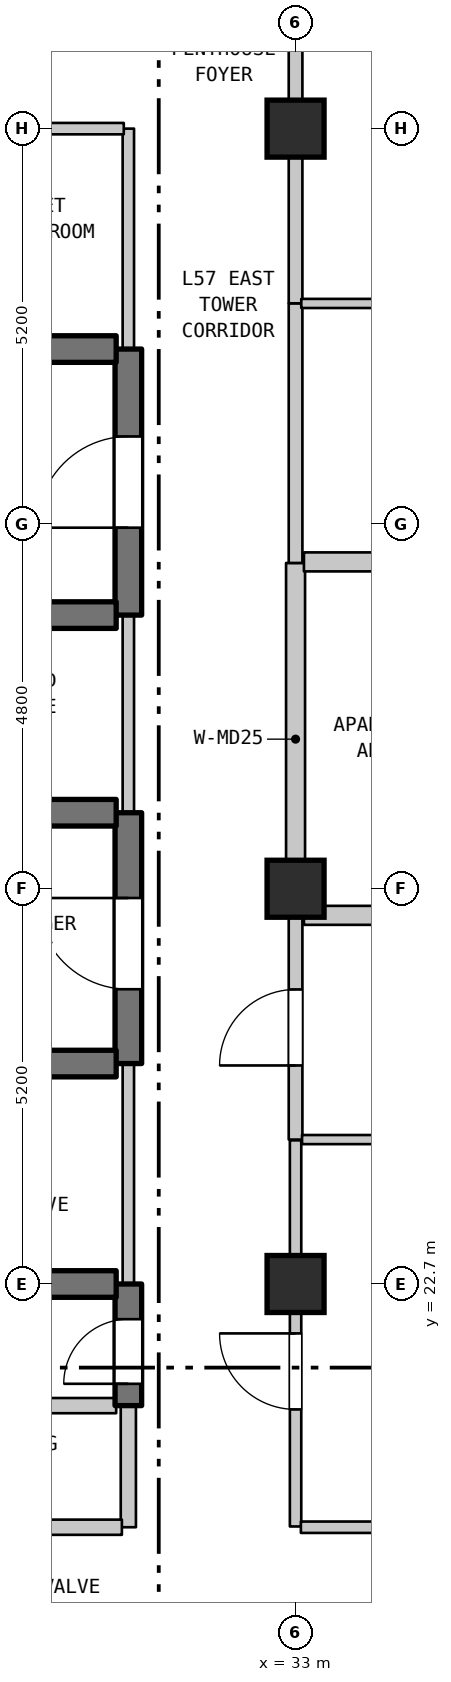
"""IFC4 building model, lengths in metres.
Left out: names, types, materials, properties, quantities, classifications, styles, units other than length and angle.
Written with IfcOpenShell. Run it as: python <this file> out.ifc"""

import sys

from ifc_helpers import new_model, si_unit, direction, frame, frame_2d, origin, origin_2d, place, context, subcontext, project, spatial, rectangle, extrude, element, fill, save


model = new_model("IFC4")
c1 = context("Model", 3, precision=1e-05, world=origin(), true_north=direction((0.0, 1.0)))
c2 = subcontext(c1, "Body", "Model", "MODEL_VIEW")
j1 = project(units=[si_unit("LENGTHUNIT", "METRE"), si_unit("PLANEANGLEUNIT", "RADIAN")], contexts=[c1])
p1 = place(None, origin())
s1 = spatial("IfcSite", under=j1, at=p1, CompositionType="ELEMENT")
p2 = place(p1, origin())
s2 = spatial("IfcBuilding", under=s1, at=p2, CompositionType="ELEMENT")
p3 = place(p2, frame((0.0, 0.0, 230.2)))
s3 = spatial("IfcBuildingStorey", under=s2, at=p3, CompositionType="ELEMENT", Elevation=230.2)
for number, where, z_axis, x_axis in (
    (1, (33.0, 22.7, 0.0), (0.0, 0.0, 1.0), (1.0, 0.0, 0.0)),
    (2, (33.0, 27.9, 0.0), (0.0, 0.0, 1.0), (1.0, 0.0, 0.0)),
    (3, (33.0, 37.9, 0.0), (0.0, 0.0, 1.0), (1.0, 0.0, 0.0)),
):
    element("IfcColumn", number, at=place(p3, frame(where, z_axis=z_axis, x_axis=x_axis)), inside=s3, PredefinedType="COLUMN", context=c2, shape_type="SweptSolid", body=[
        extrude(rectangle(XDim=0.75, YDim=0.75, at=origin_2d()), origin(), (0.0, 0.0, 1.0), 3.7),
    ])
p4 = place(p3, frame((30.8, 19.5, 0.0), z_axis=(0.0, 0.0, 1.0), x_axis=(0.0, 1.0, 0.0)))
e4 = element("IfcWall", 4, at=p4, inside=s3, PredefinedType="STANDARD", context=c2, shape_type="SweptSolid", body=[
    extrude(rectangle(XDim=1.6, YDim=0.2, at=frame_2d((0.8, 0.0))), origin(), (0.0, 0.0, 1.0), 3.39),
])
p5 = place(p3, frame((30.8, 21.1, 0.0), z_axis=(0.0, 0.0, 1.0), x_axis=(0.0, 1.0, 0.0)))
e5 = element("IfcWall", 5, at=p5, inside=s3, PredefinedType="SHEAR", context=c2, shape_type="SweptSolid", body=[
    extrude(rectangle(XDim=1.6, YDim=0.35, at=frame_2d((0.8, 0.0))), origin(), (0.0, 0.0, 1.0), 3.39),
])
p6 = place(p5, frame((0.287, 0.0, 0.0)))
e6 = element("IfcOpeningElement", 6, at=p6, cuts=e5, PredefinedType="OPENING", context=c2, shape_type="SweptSolid", body=[
    extrude(rectangle(XDim=0.85, YDim=2.1, at=frame_2d((0.425, 1.05))), frame((0.0, 0.185, 0.0), z_axis=(0.0, -1.0, 0.0), x_axis=(1.0, 0.0, 0.0)), (0.0, 0.0, 1.0), 0.37),
])
p7 = place(p3, frame((30.8, 22.7, 0.0), z_axis=(0.0, 0.0, 1.0), x_axis=(0.0, 1.0, 0.0)))
e7 = element("IfcWall", 7, at=p7, inside=s3, PredefinedType="STANDARD", context=c2, shape_type="SweptSolid", body=[
    extrude(rectangle(XDim=2.9, YDim=0.15, at=frame_2d((1.45, 0.0))), origin(), (0.0, 0.0, 1.0), 3.39),
])
p8 = place(p3, frame((30.8, 25.6, 0.0), z_axis=(0.0, 0.0, 1.0), x_axis=(0.0, 1.0, 0.0)))
e8 = element("IfcWall", 8, at=p8, inside=s3, PredefinedType="SHEAR", context=c2, shape_type="SweptSolid", body=[
    extrude(rectangle(XDim=3.3, YDim=0.35, at=frame_2d((1.65, 0.0))), origin(), (0.0, 0.0, 1.0), 3.39),
])
p9 = place(p8, frame((0.978, 0.0, 0.0)))
e9 = element("IfcOpeningElement", 9, at=p9, cuts=e8, PredefinedType="OPENING", context=c2, shape_type="SweptSolid", body=[
    extrude(rectangle(XDim=1.2, YDim=2.2, at=frame_2d((0.6, 1.1))), frame((0.0, 0.185, 0.0), z_axis=(0.0, -1.0, 0.0), x_axis=(1.0, 0.0, 0.0)), (0.0, 0.0, 1.0), 0.37),
])
p10 = place(p3, frame((30.8, 28.9, 0.0), z_axis=(0.0, 0.0, 1.0), x_axis=(0.0, 1.0, 0.0)))
e10 = element("IfcWall", 10, at=p10, inside=s3, PredefinedType="STANDARD", context=c2, shape_type="SweptSolid", body=[
    extrude(rectangle(XDim=2.6, YDim=0.15, at=frame_2d((1.3, 0.0))), origin(), (0.0, 0.0, 1.0), 3.39),
])
p11 = place(p3, frame((30.8, 31.5, 0.0), z_axis=(0.0, 0.0, 1.0), x_axis=(0.0, 1.0, 0.0)))
e11 = element("IfcWall", 11, at=p11, inside=s3, PredefinedType="SHEAR", context=c2, shape_type="SweptSolid", body=[
    extrude(rectangle(XDim=3.5, YDim=0.35, at=frame_2d((1.75, 0.0))), origin(), (0.0, 0.0, 1.0), 3.39),
])
p12 = place(p11, frame((1.15, 0.0, 0.0)))
e12 = element("IfcOpeningElement", 12, at=p12, cuts=e11, PredefinedType="OPENING", context=c2, shape_type="SweptSolid", body=[
    extrude(rectangle(XDim=1.2, YDim=2.2, at=frame_2d((0.6, 1.1))), frame((0.0, 0.185, 0.0), z_axis=(0.0, -1.0, 0.0), x_axis=(1.0, 0.0, 0.0)), (0.0, 0.0, 1.0), 0.37),
])
p13 = place(p3, frame((30.8, 35.0, 0.0), z_axis=(0.0, 0.0, 1.0), x_axis=(0.0, 1.0, 0.0)))
e13 = element("IfcWall", 13, at=p13, inside=s3, PredefinedType="STANDARD", context=c2, shape_type="SweptSolid", body=[
    extrude(rectangle(XDim=2.9, YDim=0.15, at=frame_2d((1.45, 0.0))), origin(), (0.0, 0.0, 1.0), 3.39),
])
p14 = place(p3, frame((33.0, 19.51, 0.0), z_axis=(0.0, 0.0, 1.0), x_axis=(0.0, 1.0, 0.0)))
e14 = element("IfcWall", 14, at=p14, inside=s3, PredefinedType="STANDARD", context=c2, shape_type="SweptSolid", body=[
    extrude(rectangle(XDim=5.08, YDim=0.15, at=frame_2d((2.54, 0.0))), origin(), (0.0, 0.0, 1.0), 2.99),
])
p15 = place(p14, frame((1.54, 0.0, 0.0)))
e15 = element("IfcOpeningElement", 15, at=p15, cuts=e14, PredefinedType="OPENING", context=c2, shape_type="SweptSolid", body=[
    extrude(rectangle(XDim=1.0, YDim=2.15, at=frame_2d((0.5, 1.075))), frame((0.0, 0.085, 0.0), z_axis=(0.0, -1.0, 0.0), x_axis=(1.0, 0.0, 0.0)), (0.0, 0.0, 1.0), 0.17),
])
p16 = place(p3, frame((33.0, 24.6, 0.0), z_axis=(0.0, 0.0, 1.0), x_axis=(0.0, 1.0, 0.0)))
e16 = element("IfcWall", 16, at=p16, inside=s3, PredefinedType="STANDARD", context=c2, shape_type="SweptSolid", body=[
    extrude(rectangle(XDim=2.95, YDim=0.18, at=frame_2d((1.475, 0.0))), origin(), (0.0, 0.0, 1.0), 2.99),
])
p17 = place(p16, frame((0.975, 0.0, 0.0)))
e17 = element("IfcOpeningElement", 17, at=p17, cuts=e16, PredefinedType="OPENING", context=c2, shape_type="SweptSolid", body=[
    extrude(rectangle(XDim=1.0, YDim=2.15, at=frame_2d((0.5, 1.075))), frame((0.0, 0.1, 0.0), z_axis=(0.0, -1.0, 0.0), x_axis=(1.0, 0.0, 0.0)), (0.0, 0.0, 1.0), 0.2),
])
p18 = place(p3, frame((33.0, 27.55, 0.0), z_axis=(0.0, 0.0, 1.0), x_axis=(0.0, 1.0, 0.0)))
e18 = element("IfcWall", 18, at=p18, inside=s3, PredefinedType="STANDARD", context=c2, shape_type="SweptSolid", body=[
    extrude(rectangle(XDim=4.636, YDim=0.25, at=frame_2d((2.318, 0.0))), origin(), (0.0, 0.0, 1.0), 2.89),
])
p19 = place(p3, frame((33.0, 32.186, 0.0), z_axis=(0.0, 0.0, 1.0), x_axis=(0.0, 1.0, 0.0)))
e19 = element("IfcWall", 19, at=p19, inside=s3, PredefinedType="STANDARD", context=c2, shape_type="SweptSolid", body=[
    extrude(rectangle(XDim=3.416, YDim=0.18, at=frame_2d((1.708, 0.0))), origin(), (0.0, 0.0, 1.0), 2.89),
])
p20 = place(p3, frame((33.0, 35.602, 0.0), z_axis=(0.0, 0.0, 1.0), x_axis=(0.0, 1.0, 0.0)))
e20 = element("IfcWall", 20, at=p20, inside=s3, PredefinedType="STANDARD", context=c2, shape_type="SweptSolid", body=[
    extrude(rectangle(XDim=2.298, YDim=0.18, at=frame_2d((1.149, 0.0))), origin(), (0.0, 0.0, 1.0), 2.89),
])
p21 = place(p3, frame((27.285, 19.5, 0.0), z_axis=(0.0, 0.0, 1.0), x_axis=(1.0, 0.0, 0.0)))
e21 = element("IfcWall", 21, at=p21, inside=s3, PredefinedType="STANDARD", context=c2, shape_type="SweptSolid", body=[
    extrude(rectangle(XDim=3.43, YDim=0.2, at=frame_2d((1.715, 0.0))), origin(), (0.0, 0.0, 1.0), 3.39),
])
p22 = place(p21, frame((1.192, 0.0, 0.0)))
e22 = element("IfcOpeningElement", 22, at=p22, cuts=e21, PredefinedType="OPENING", context=c2, shape_type="SweptSolid", body=[
    extrude(rectangle(XDim=0.9, YDim=2.15, at=frame_2d((0.45, 1.075))), frame((0.0, 0.11, 0.0), z_axis=(0.0, -1.0, 0.0), x_axis=(1.0, 0.0, 0.0)), (0.0, 0.0, 1.0), 0.22),
])
p23 = place(p3, frame((33.07, 19.5, 0.0), z_axis=(0.0, 0.0, 1.0), x_axis=(1.0, 0.0, 0.0)))
e23 = element("IfcWall", 23, at=p23, inside=s3, PredefinedType="STANDARD", context=c2, shape_type="SweptSolid", body=[
    extrude(rectangle(XDim=18.87, YDim=0.15, at=frame_2d((9.435, 0.0))), origin(), (0.0, 0.0, 1.0), 3.39),
])
p24 = place(p23, frame((8.935, 0.0, 0.0)))
e24 = element("IfcOpeningElement", 24, at=p24, cuts=e23, PredefinedType="OPENING", context=c2, shape_type="SweptSolid", body=[
    extrude(rectangle(XDim=1.0, YDim=2.15, at=frame_2d((0.5, 1.075))), frame((0.0, 0.085, 0.0), z_axis=(0.0, -1.0, 0.0), x_axis=(1.0, 0.0, 0.0)), (0.0, 0.0, 1.0), 0.17),
])
p25 = place(p3, frame((27.285, 21.1, 0.0), z_axis=(0.0, 0.0, 1.0), x_axis=(1.0, 0.0, 0.0)))
e25 = element("IfcWall", 25, at=p25, inside=s3, PredefinedType="STANDARD", context=c2, shape_type="SweptSolid", body=[
    extrude(rectangle(XDim=3.355, YDim=0.2, at=frame_2d((1.677, 0.0))), origin(), (0.0, 0.0, 1.0), 3.39),
])
p26 = place(p3, frame((27.46, 22.7, 0.0), z_axis=(0.0, 0.0, 1.0), x_axis=(1.0, 0.0, 0.0)))
e26 = element("IfcWall", 26, at=p26, inside=s3, PredefinedType="SHEAR", context=c2, shape_type="SweptSolid", body=[
    extrude(rectangle(XDim=3.18, YDim=0.35, at=frame_2d((1.59, 0.0))), origin(), (0.0, 0.0, 1.0), 3.39),
])
p27 = place(p3, frame((33.085, 24.6, 0.0), z_axis=(0.0, 0.0, 1.0), x_axis=(1.0, 0.0, 0.0)))
e27 = element("IfcWall", 27, at=p27, inside=s3, PredefinedType="PARTITIONING", context=c2, shape_type="SweptSolid", body=[
    extrude(rectangle(XDim=3.47, YDim=0.12, at=frame_2d((1.735, 0.0))), origin(), (0.0, 0.0, 1.0), 3.39),
])
p28 = place(p3, frame((27.46, 25.6, 0.0), z_axis=(0.0, 0.0, 1.0), x_axis=(1.0, 0.0, 0.0)))
e28 = element("IfcWall", 28, at=p28, inside=s3, PredefinedType="SHEAR", context=c2, shape_type="SweptSolid", body=[
    extrude(rectangle(XDim=3.18, YDim=0.35, at=frame_2d((1.59, 0.0))), origin(), (0.0, 0.0, 1.0), 3.39),
])
p29 = place(p28, frame((1.115, 0.0, 0.0)))
e29 = element("IfcOpeningElement", 29, at=p29, cuts=e28, PredefinedType="OPENING", context=c2, shape_type="SweptSolid", body=[
    extrude(rectangle(XDim=0.95, YDim=2.15, at=frame_2d((0.475, 1.075))), frame((0.0, 0.185, 0.0), z_axis=(0.0, -1.0, 0.0), x_axis=(1.0, 0.0, 0.0)), (0.0, 0.0, 1.0), 0.37),
])
p30 = place(p3, frame((33.11, 27.55, 0.0), z_axis=(0.0, 0.0, 1.0), x_axis=(1.0, 0.0, 0.0)))
e30 = element("IfcWall", 30, at=p30, inside=s3, PredefinedType="STANDARD", context=c2, shape_type="SweptSolid", body=[
    extrude(rectangle(XDim=4.36, YDim=0.25, at=frame_2d((2.18, 0.0))), origin(), (0.0, 0.0, 1.0), 3.39),
])
p31 = place(p3, frame((27.46, 28.9, 0.0), z_axis=(0.0, 0.0, 1.0), x_axis=(1.0, 0.0, 0.0)))
e31 = element("IfcWall", 31, at=p31, inside=s3, PredefinedType="SHEAR", context=c2, shape_type="SweptSolid", body=[
    extrude(rectangle(XDim=3.18, YDim=0.35, at=frame_2d((1.59, 0.0))), origin(), (0.0, 0.0, 1.0), 3.39),
])
p32 = place(p31, frame((1.115, 0.0, 0.0)))
e32 = element("IfcOpeningElement", 32, at=p32, cuts=e31, PredefinedType="OPENING", context=c2, shape_type="SweptSolid", body=[
    extrude(rectangle(XDim=0.95, YDim=2.15, at=frame_2d((0.475, 1.075))), frame((0.0, 0.185, 0.0), z_axis=(0.0, -1.0, 0.0), x_axis=(1.0, 0.0, 0.0)), (0.0, 0.0, 1.0), 0.37),
])
p33 = place(p3, frame((27.46, 31.5, 0.0), z_axis=(0.0, 0.0, 1.0), x_axis=(1.0, 0.0, 0.0)))
e33 = element("IfcWall", 33, at=p33, inside=s3, PredefinedType="SHEAR", context=c2, shape_type="SweptSolid", body=[
    extrude(rectangle(XDim=3.18, YDim=0.35, at=frame_2d((1.59, 0.0))), origin(), (0.0, 0.0, 1.0), 3.39),
])
p34 = place(p3, frame((33.11, 32.2, 0.0), z_axis=(0.0, 0.0, 1.0), x_axis=(1.0, 0.0, 0.0)))
e34 = element("IfcWall", 34, at=p34, inside=s3, PredefinedType="STANDARD", context=c2, shape_type="SweptSolid", body=[
    extrude(rectangle(XDim=4.36, YDim=0.25, at=frame_2d((2.18, 0.0))), origin(), (0.0, 0.0, 1.0), 3.39),
])
p35 = place(p3, frame((26.645, 35.0, 0.0), z_axis=(0.0, 0.0, 1.0), x_axis=(1.0, 0.0, 0.0)))
e35 = element("IfcWall", 35, at=p35, inside=s3, PredefinedType="SHEAR", context=c2, shape_type="SweptSolid", body=[
    extrude(rectangle(XDim=3.995, YDim=0.35, at=frame_2d((1.998, 0.0))), origin(), (0.0, 0.0, 1.0), 3.39),
])
p36 = place(p35, frame((1.508, 0.0, 0.0)))
e36 = element("IfcOpeningElement", 36, at=p36, cuts=e35, PredefinedType="OPENING", context=c2, shape_type="SweptSolid", body=[
    extrude(rectangle(XDim=0.95, YDim=2.15, at=frame_2d((0.475, 1.075))), frame((0.0, 0.185, 0.0), z_axis=(0.0, -1.0, 0.0), x_axis=(1.0, 0.0, 0.0)), (0.0, 0.0, 1.0), 0.37),
])
p37 = place(p3, frame((33.075, 35.6, 0.0), z_axis=(0.0, 0.0, 1.0), x_axis=(1.0, 0.0, 0.0)))
e37 = element("IfcWall", 37, at=p37, inside=s3, PredefinedType="PARTITIONING", context=c2, shape_type="SweptSolid", body=[
    extrude(rectangle(XDim=4.46, YDim=0.12, at=frame_2d((2.23, 0.0))), origin(), (0.0, 0.0, 1.0), 3.39),
])
p38 = place(p3, frame((26.645, 37.9, 0.0), z_axis=(0.0, 0.0, 1.0), x_axis=(1.0, 0.0, 0.0)))
e38 = element("IfcWall", 38, at=p38, inside=s3, PredefinedType="STANDARD", context=c2, shape_type="SweptSolid", body=[
    extrude(rectangle(XDim=4.095, YDim=0.15, at=frame_2d((2.047, 0.0))), origin(), (0.0, 0.0, 1.0), 2.89),
])
p39 = place(p3, frame((33.0, 37.9, 0.0), z_axis=(0.0, 0.0, 1.0), x_axis=(0.0, 1.0, 0.0)))
e39 = element("IfcWall", 39, at=p39, inside=s3, PredefinedType="STANDARD", context=c2, shape_type="SweptSolid", body=[
    extrude(rectangle(XDim=1.85, YDim=0.18, at=frame_2d((0.925, 0.0))), origin(), (0.0, 0.0, 1.0), 2.79),
])
p40 = place(p6, origin())
e40 = element("IfcDoor", 40, at=p40, inside=s3, OperationType="SINGLE_SWING_LEFT", PredefinedType="DOOR", context=c2, shape_type="SweptSolid", body=[
    extrude(rectangle(XDim=0.85, YDim=2.1, at=frame_2d((0.425, 1.05))), frame((0.0, 0.025, 0.0), z_axis=(0.0, -1.0, 0.0), x_axis=(1.0, 0.0, 0.0)), (0.0, 0.0, 1.0), 0.05),
])
fill(e6, e40)
p41 = place(p9, origin())
e41 = element("IfcDoor", 41, at=p41, inside=s3, OperationType="SINGLE_SWING_RIGHT", PredefinedType="DOOR", context=c2, shape_type="SweptSolid", body=[
    extrude(rectangle(XDim=1.2, YDim=2.2, at=frame_2d((0.6, 1.1))), frame((0.0, 0.025, 0.0), z_axis=(0.0, -1.0, 0.0), x_axis=(1.0, 0.0, 0.0)), (0.0, 0.0, 1.0), 0.05),
])
fill(e9, e41)
p42 = place(p12, origin())
e42 = element("IfcDoor", 42, at=p42, inside=s3, OperationType="SINGLE_SWING_LEFT", PredefinedType="DOOR", context=c2, shape_type="SweptSolid", body=[
    extrude(rectangle(XDim=1.2, YDim=2.2, at=frame_2d((0.6, 1.1))), frame((0.0, 0.025, 0.0), z_axis=(0.0, -1.0, 0.0), x_axis=(1.0, 0.0, 0.0)), (0.0, 0.0, 1.0), 0.05),
])
fill(e12, e42)
p43 = place(p15, origin())
e43 = element("IfcDoor", 43, at=p43, inside=s3, OperationType="SINGLE_SWING_RIGHT", PredefinedType="DOOR", context=c2, shape_type="SweptSolid", body=[
    extrude(rectangle(XDim=1.0, YDim=2.15, at=frame_2d((0.5, 1.075))), frame((0.0, 0.025, 0.0), z_axis=(0.0, -1.0, 0.0), x_axis=(1.0, 0.0, 0.0)), (0.0, 0.0, 1.0), 0.05),
])
fill(e15, e43)
p44 = place(p17, origin())
e44 = element("IfcDoor", 44, at=p44, inside=s3, OperationType="SINGLE_SWING_LEFT", PredefinedType="DOOR", context=c2, shape_type="SweptSolid", body=[
    extrude(rectangle(XDim=1.0, YDim=2.15, at=frame_2d((0.5, 1.075))), frame((0.0, 0.025, 0.0), z_axis=(0.0, -1.0, 0.0), x_axis=(1.0, 0.0, 0.0)), (0.0, 0.0, 1.0), 0.05),
])
fill(e17, e44)
save(model, sys.argv[1])
